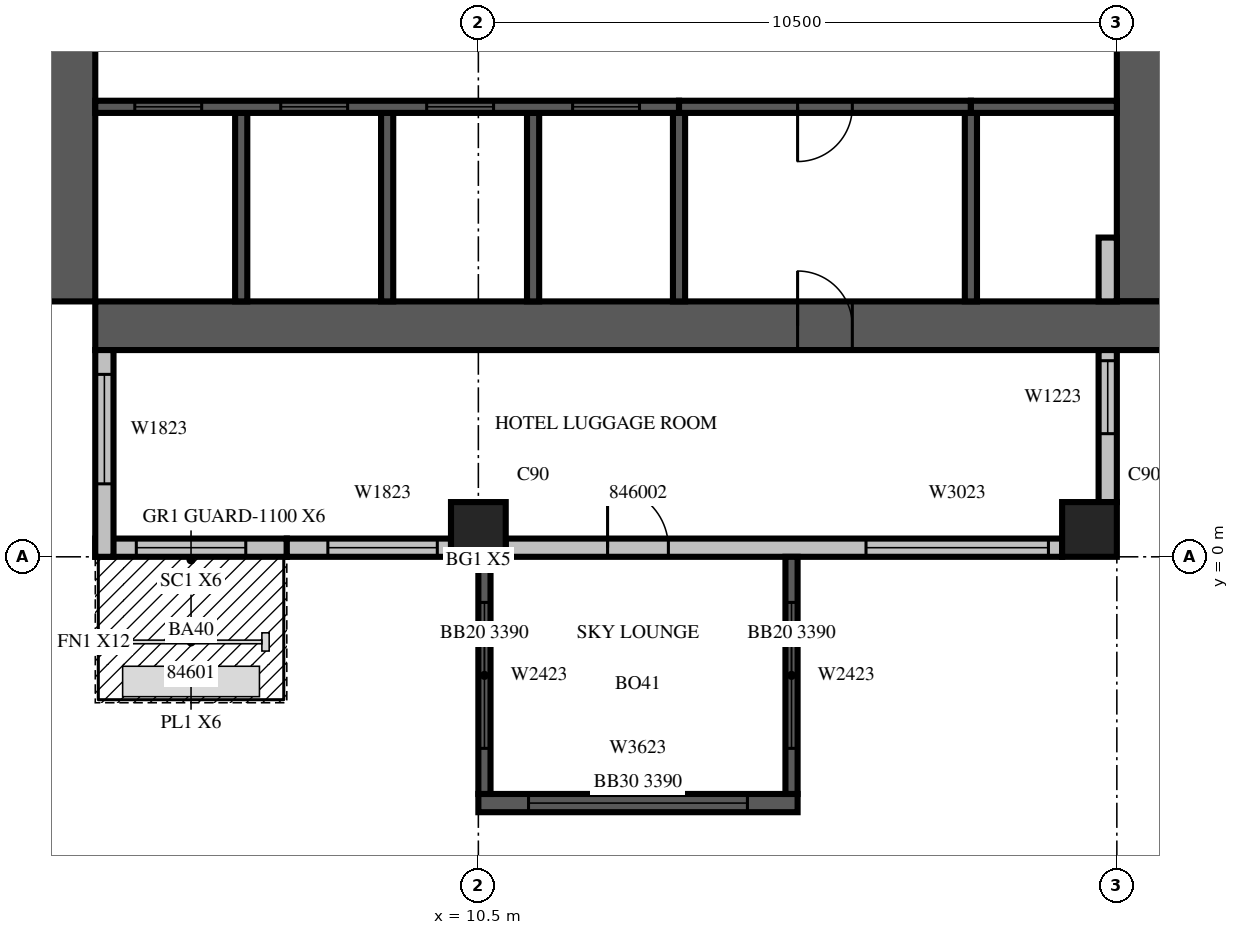
"""IFC4 building model, lengths in metres.
Left out: names, types, materials, properties, quantities, classifications, styles, units other than length and angle.
Written with IfcOpenShell. Run it as: python <this file> out.ifc"""

import sys

from ifc_helpers import new_model, si_unit, direction, frame, frame_2d, origin, origin_2d, place, context, subcontext, project, spatial, rectangle, extrude, source, transform, mapped, element, fill, save


model = new_model("IFC4")
c1 = context("Model", 3, precision=1e-05, world=origin(), true_north=direction((0.0, 1.0)))
c2 = subcontext(c1, "Body", "Model", "MODEL_VIEW")
j1 = project(units=[si_unit("LENGTHUNIT", "METRE"), si_unit("PLANEANGLEUNIT", "RADIAN")], contexts=[c1])
p1 = place(None, origin())
s1 = spatial("IfcSite", under=j1, at=p1, CompositionType="ELEMENT")
p2 = place(p1, origin())
s2 = spatial("IfcBuilding", under=s1, at=p2, CompositionType="ELEMENT")
p3 = place(p2, frame((0.0, 0.0, 208.2)))
s3 = spatial("IfcBuildingStorey", under=s2, at=p3, CompositionType="ELEMENT", Elevation=208.2)
m1 = source(origin(), c2, "Body", "SweptSolid", [
    extrude(rectangle(XDim=0.9, YDim=0.9, at=origin_2d()), origin(), (0.0, 0.0, 1.0), 3.8),
])
for number, where, z_axis, x_axis in (
    (1, (10.5, 0.45, 0.0), (0.0, 0.0, 1.0), (1.0, 0.0, 0.0)),
    (2, (20.55, 0.45, 0.0), (0.0, 0.0, 1.0), (1.0, 0.0, 0.0)),
):
    element("IfcColumn", number, at=place(p3, frame(where, z_axis=z_axis, x_axis=x_axis)), inside=s3, PredefinedType="COLUMN", context=c2, shape_type="MappedRepresentation", body=[
        mapped(m1, transform((0.0, 0.0, 0.0), scale=1.0)),
    ])
m2 = source(origin(), c2, "Body", "SweptSolid", [
    extrude(rectangle(XDim=17.6, YDim=0.8, at=frame_2d((8.8, 0.0))), origin(), (0.0, 0.0, 1.0), 3.8),
])
p4 = place(p3, frame((3.8, 4.2, 0.0), z_axis=(0.0, 0.0, 1.0), x_axis=(0.0, 1.0, 0.0)))
e3 = element("IfcWall", 3, at=p4, inside=s3, PredefinedType="SHEAR", context=c2, shape_type="MappedRepresentation", body=[
    mapped(m2, transform((0.0, 0.0, 0.0), scale=1.0)),
])
m3 = source(origin(), c2, "Body", "SweptSolid", [
    extrude(rectangle(XDim=2.2, YDim=2.1, at=frame_2d((1.1, 1.05))), frame((0.0, 0.41, 0.0), z_axis=(0.0, -1.0, 0.0), x_axis=(1.0, 0.0, 0.0)), (0.0, 0.0, 1.0), 0.82),
])
p5 = place(p4, frame((4.2, 0.0, 0.0)))
e4 = element("IfcOpeningElement", 4, at=p5, cuts=e3, PredefinedType="OPENING", context=c2, shape_type="MappedRepresentation", body=[
    mapped(m3, transform((0.0, 0.0, 0.0), scale=1.0)),
])
m4 = source(origin(), c2, "Body", "SweptSolid", [
    extrude(rectangle(XDim=0.9, YDim=2.1, at=frame_2d((0.45, 1.05))), frame((0.0, 0.41, 0.0), z_axis=(0.0, -1.0, 0.0), x_axis=(1.0, 0.0, 0.0)), (0.0, 0.0, 1.0), 0.82),
])
p6 = place(p4, frame((10.95, 0.0, 0.0)))
e5 = element("IfcOpeningElement", 5, at=p6, cuts=e3, PredefinedType="OPENING", context=c2, shape_type="MappedRepresentation", body=[
    mapped(m4, transform((0.0, 0.0, 0.0), scale=1.0)),
])
m5 = source(origin(), c2, "Body", "SweptSolid", [
    extrude(rectangle(XDim=16.8, YDim=0.8, at=frame_2d((8.4, 0.0))), origin(), (0.0, 0.0, 1.0), 3.8),
])
p7 = place(p3, frame((21.4, 4.2, 0.0), z_axis=(0.0, 0.0, 1.0), x_axis=(0.0, 1.0, 0.0)))
e6 = element("IfcWall", 6, at=p7, inside=s3, PredefinedType="SHEAR", context=c2, shape_type="MappedRepresentation", body=[
    mapped(m5, transform((0.0, 0.0, 0.0), scale=1.0)),
])
m6 = source(origin(), c2, "Body", "SweptSolid", [
    extrude(rectangle(XDim=1.2, YDim=2.1, at=frame_2d((0.6, 1.05))), frame((0.0, 0.41, 0.0), z_axis=(0.0, -1.0, 0.0), x_axis=(1.0, 0.0, 0.0)), (0.0, 0.0, 1.0), 0.82),
])
p8 = place(p7, frame((14.7, 0.0, 0.0)))
e7 = element("IfcOpeningElement", 7, at=p8, cuts=e6, PredefinedType="OPENING", context=c2, shape_type="MappedRepresentation", body=[
    mapped(m6, transform((0.0, 0.0, 0.0), scale=1.0)),
])
p9 = place(p3, frame((4.2, 3.8, 0.0), z_axis=(0.0, 0.0, 1.0), x_axis=(1.0, 0.0, 0.0)))
e8 = element("IfcWall", 8, at=p9, inside=s3, PredefinedType="SHEAR", context=c2, shape_type="MappedRepresentation", body=[
    mapped(m2, transform((0.0, 0.0, 0.0), scale=1.0)),
])
p10 = place(p9, frame((11.55, 0.0, 0.0)))
e9 = element("IfcOpeningElement", 9, at=p10, cuts=e8, PredefinedType="OPENING", context=c2, shape_type="MappedRepresentation", body=[
    mapped(m4, transform((0.0, 0.0, 0.0), scale=1.0)),
])
m7 = source(origin(), c2, "Body", "SweptSolid", [
    extrude(rectangle(XDim=3.15, YDim=0.3, at=frame_2d((1.575, 0.0))), origin(), (0.0, 0.0, 1.0), 3.4),
])
p11 = place(p3, frame((4.2, 0.15, 0.0), z_axis=(0.0, 0.0, 1.0), x_axis=(1.0, 0.0, 0.0)))
e10 = element("IfcWall", 10, at=p11, inside=s3, PredefinedType="STANDARD", context=c2, shape_type="MappedRepresentation", body=[
    mapped(m7, transform((0.0, 0.0, 0.0), scale=1.0)),
])
m8 = source(origin(), c2, "Body", "SweptSolid", [
    extrude(rectangle(XDim=1.8, YDim=2.4, at=frame_2d((0.9, 1.2))), frame((0.0, 0.16, 0.0), z_axis=(0.0, -1.0, 0.0), x_axis=(1.0, 0.0, 0.0)), (0.0, 0.0, 1.0), 0.32),
])
p12 = place(p11, frame((0.675, 0.0, 0.0)))
e11 = element("IfcOpeningElement", 11, at=p12, cuts=e10, PredefinedType="OPENING", context=c2, shape_type="MappedRepresentation", body=[
    mapped(m8, transform((0.0, 0.0, 0.0), scale=1.0)),
])
m9 = source(origin(), c2, "Body", "SweptSolid", [
    extrude(rectangle(XDim=2.7, YDim=0.3, at=frame_2d((1.35, 0.0))), origin(), (0.0, 0.0, 1.0), 3.4),
])
p13 = place(p3, frame((7.35, 0.15, 0.0), z_axis=(0.0, 0.0, 1.0), x_axis=(1.0, 0.0, 0.0)))
e12 = element("IfcWall", 12, at=p13, inside=s3, PredefinedType="STANDARD", context=c2, shape_type="MappedRepresentation", body=[
    mapped(m9, transform((0.0, 0.0, 0.0), scale=1.0)),
])
m10 = source(origin(), c2, "Body", "SweptSolid", [
    extrude(rectangle(XDim=1.8, YDim=2.3, at=frame_2d((0.9, 1.15))), frame((0.0, 0.16, 0.0), z_axis=(0.0, -1.0, 0.0), x_axis=(1.0, 0.0, 0.0)), (0.0, 0.0, 1.0), 0.32),
])
p14 = place(p13, frame((0.675, 0.0, 0.6)))
e13 = element("IfcOpeningElement", 13, at=p14, cuts=e12, PredefinedType="OPENING", context=c2, shape_type="MappedRepresentation", body=[
    mapped(m10, transform((0.0, 0.0, 0.0), scale=1.0)),
])
m11 = source(origin(), c2, "Body", "SweptSolid", [
    extrude(rectangle(XDim=9.15, YDim=0.3, at=frame_2d((4.575, 0.0))), origin(), (0.0, 0.0, 1.0), 3.4),
])
p15 = place(p3, frame((10.95, 0.15, 0.0), z_axis=(0.0, 0.0, 1.0), x_axis=(1.0, 0.0, 0.0)))
e14 = element("IfcWall", 14, at=p15, inside=s3, PredefinedType="STANDARD", context=c2, shape_type="MappedRepresentation", body=[
    mapped(m11, transform((0.0, 0.0, 0.0), scale=1.0)),
])
m12 = source(origin(), c2, "Body", "SweptSolid", [
    extrude(rectangle(XDim=3.0, YDim=2.3, at=frame_2d((1.5, 1.15))), frame((0.0, 0.16, 0.0), z_axis=(0.0, -1.0, 0.0), x_axis=(1.0, 0.0, 0.0)), (0.0, 0.0, 1.0), 0.32),
])
p16 = place(p15, frame((5.925, 0.0, 0.6)))
e15 = element("IfcOpeningElement", 15, at=p16, cuts=e14, PredefinedType="OPENING", context=c2, shape_type="MappedRepresentation", body=[
    mapped(m12, transform((0.0, 0.0, 0.0), scale=1.0)),
])
m13 = source(origin(), c2, "Body", "SweptSolid", [
    extrude(rectangle(XDim=1.0, YDim=2.1, at=frame_2d((0.5, 1.05))), frame((0.0, 0.16, 0.0), z_axis=(0.0, -1.0, 0.0), x_axis=(1.0, 0.0, 0.0)), (0.0, 0.0, 1.0), 0.32),
])
p17 = place(p15, frame((1.675, 0.0, 0.0)))
e16 = element("IfcOpeningElement", 16, at=p17, cuts=e14, PredefinedType="OPENING", context=c2, shape_type="MappedRepresentation", body=[
    mapped(m13, transform((0.0, 0.0, 0.0), scale=1.0)),
])
m14 = source(origin(), c2, "Body", "SweptSolid", [
    extrude(rectangle(XDim=2.5, YDim=0.3, at=frame_2d((1.25, 0.0))), origin(), (0.0, 0.0, 1.0), 3.4),
])
p18 = place(p3, frame((20.85, 0.9, 0.0), z_axis=(0.0, 0.0, 1.0), x_axis=(0.0, 1.0, 0.0)))
e17 = element("IfcWall", 17, at=p18, inside=s3, PredefinedType="STANDARD", context=c2, shape_type="MappedRepresentation", body=[
    mapped(m14, transform((0.0, 0.0, 0.0), scale=1.0)),
])
m15 = source(origin(), c2, "Body", "SweptSolid", [
    extrude(rectangle(XDim=1.2, YDim=2.3, at=frame_2d((0.6, 1.15))), frame((0.0, 0.16, 0.0), z_axis=(0.0, -1.0, 0.0), x_axis=(1.0, 0.0, 0.0)), (0.0, 0.0, 1.0), 0.32),
])
p19 = place(p18, frame((1.125, 0.0, 0.6)))
e18 = element("IfcOpeningElement", 18, at=p19, cuts=e17, PredefinedType="OPENING", context=c2, shape_type="MappedRepresentation", body=[
    mapped(m15, transform((0.0, 0.0, 0.0), scale=1.0)),
])
m16 = source(origin(), c2, "Body", "SweptSolid", [
    extrude(rectangle(XDim=1.05, YDim=0.3, at=frame_2d((0.525, 0.0))), origin(), (0.0, 0.0, 1.0), 3.4),
])
p20 = place(p3, frame((20.85, 4.2, 0.0), z_axis=(0.0, 0.0, 1.0), x_axis=(0.0, 1.0, 0.0)))
e19 = element("IfcWall", 19, at=p20, inside=s3, PredefinedType="STANDARD", context=c2, shape_type="MappedRepresentation", body=[
    mapped(m16, transform((0.0, 0.0, 0.0), scale=1.0)),
])
m17 = source(origin(), c2, "Body", "SweptSolid", [
    extrude(rectangle(XDim=3.4, YDim=0.3, at=frame_2d((1.7, 0.0))), origin(), (0.0, 0.0, 1.0), 3.4),
])
p21 = place(p3, frame((4.35, 3.4, 0.0), z_axis=(0.0, 0.0, 1.0), x_axis=(0.0, -1.0, 0.0)))
e20 = element("IfcWall", 20, at=p21, inside=s3, PredefinedType="STANDARD", context=c2, shape_type="MappedRepresentation", body=[
    mapped(m17, transform((0.0, 0.0, 0.0), scale=1.0)),
])
p22 = place(p21, frame((0.4, 0.0, 0.6)))
e21 = element("IfcOpeningElement", 21, at=p22, cuts=e20, PredefinedType="OPENING", context=c2, shape_type="MappedRepresentation", body=[
    mapped(m10, transform((0.0, 0.0, 0.0), scale=1.0)),
])
m18 = source(origin(), c2, "Body", "SweptSolid", [
    extrude(rectangle(XDim=5.25, YDim=0.3, at=frame_2d((2.625, 0.0))), origin(), (0.0, 0.0, 1.0), 3.39),
])
p23 = place(p3, frame((10.5, -4.05, 0.0), z_axis=(0.0, 0.0, 1.0), x_axis=(1.0, 0.0, 0.0)))
e22 = element("IfcWall", 22, at=p23, inside=s3, PredefinedType="SOLIDWALL", context=c2, shape_type="MappedRepresentation", body=[
    mapped(m18, transform((0.0, 0.0, 0.0), scale=1.0)),
])
m19 = source(origin(), c2, "Body", "SweptSolid", [
    extrude(rectangle(XDim=3.6, YDim=2.3, at=frame_2d((1.8, 1.15))), frame((0.0, 0.16, 0.0), z_axis=(0.0, -1.0, 0.0), x_axis=(1.0, 0.0, 0.0)), (0.0, 0.0, 1.0), 0.32),
])
p24 = place(p23, frame((0.825, 0.0, 0.6)))
e23 = element("IfcOpeningElement", 23, at=p24, cuts=e22, PredefinedType="OPENING", context=c2, shape_type="MappedRepresentation", body=[
    mapped(m19, transform((0.0, 0.0, 0.0), scale=1.0)),
])
m20 = source(origin(), c2, "Body", "SweptSolid", [
    extrude(rectangle(XDim=3.9, YDim=0.2, at=frame_2d((1.95, 0.0))), origin(), (0.0, 0.0, 1.0), 3.39),
])
p25 = place(p3, frame((10.6, 0.0, 0.0), z_axis=(0.0, 0.0, 1.0), x_axis=(0.0, -1.0, 0.0)))
e24 = element("IfcWall", 24, at=p25, inside=s3, PredefinedType="SOLIDWALL", context=c2, shape_type="MappedRepresentation", body=[
    mapped(m20, transform((0.0, 0.0, 0.0), scale=1.0)),
])
m21 = source(origin(), c2, "Body", "SweptSolid", [
    extrude(rectangle(XDim=2.4, YDim=2.3, at=frame_2d((1.2, 1.15))), frame((0.0, 0.11, 0.0), z_axis=(0.0, -1.0, 0.0), x_axis=(1.0, 0.0, 0.0)), (0.0, 0.0, 1.0), 0.22),
])
p26 = place(p25, frame((0.75, 0.0, 0.6)))
e25 = element("IfcOpeningElement", 25, at=p26, cuts=e24, PredefinedType="OPENING", context=c2, shape_type="MappedRepresentation", body=[
    mapped(m21, transform((0.0, 0.0, 0.0), scale=1.0)),
])
p27 = place(p3, frame((15.65, 0.0, 0.0), z_axis=(0.0, 0.0, 1.0), x_axis=(0.0, -1.0, 0.0)))
e26 = element("IfcWall", 26, at=p27, inside=s3, PredefinedType="SOLIDWALL", context=c2, shape_type="MappedRepresentation", body=[
    mapped(m20, transform((0.0, 0.0, 0.0), scale=1.0)),
])
p28 = place(p27, frame((0.75, 0.0, 0.6)))
e27 = element("IfcOpeningElement", 27, at=p28, cuts=e26, PredefinedType="OPENING", context=c2, shape_type="MappedRepresentation", body=[
    mapped(m21, transform((0.0, 0.0, 0.0), scale=1.0)),
])
m22 = source(origin(), c2, "Body", "SweptSolid", [
    extrude(rectangle(XDim=3.1, YDim=0.2, at=frame_2d((1.55, 0.0))), origin(), (0.0, 0.0, 1.0), 3.8),
])
for number, where, z_axis, x_axis in (
    (28, (6.6, 4.2, 0.0), (0.0, 0.0, 1.0), (0.0, 1.0, 0.0)),
    (29, (9.0, 4.2, 0.0), (0.0, 0.0, 1.0), (0.0, 1.0, 0.0)),
    (30, (11.4, 4.2, 0.0), (0.0, 0.0, 1.0), (0.0, 1.0, 0.0)),
):
    element("IfcWall", number, at=place(p3, frame(where, z_axis=z_axis, x_axis=x_axis)), inside=s3, PredefinedType="SOLIDWALL", context=c2, shape_type="MappedRepresentation", body=[
        mapped(m22, transform((0.0, 0.0, 0.0), scale=1.0)),
    ])
m23 = source(origin(), c2, "Body", "SweptSolid", [
    extrude(rectangle(XDim=3.1, YDim=0.2, at=frame_2d((1.55, 0.0))), origin(), (0.0, 0.0, 1.0), 3.4),
])
for number, where, z_axis, x_axis in (
    (31, (13.8, 4.2, 0.0), (0.0, 0.0, 1.0), (0.0, 1.0, 0.0)),
    (32, (18.6, 4.2, 0.0), (0.0, 0.0, 1.0), (0.0, 1.0, 0.0)),
):
    element("IfcWall", number, at=place(p3, frame(where, z_axis=z_axis, x_axis=x_axis)), inside=s3, PredefinedType="SOLIDWALL", context=c2, shape_type="MappedRepresentation", body=[
        mapped(m23, transform((0.0, 0.0, 0.0), scale=1.0)),
    ])
m24 = source(origin(), c2, "Body", "SweptSolid", [
    extrude(rectangle(XDim=9.6, YDim=0.2, at=frame_2d((4.8, 0.0))), origin(), (0.0, 0.0, 1.0), 3.8),
])
p29 = place(p3, frame((4.2, 7.4, 0.0), z_axis=(0.0, 0.0, 1.0), x_axis=(1.0, 0.0, 0.0)))
e33 = element("IfcWall", 33, at=p29, inside=s3, PredefinedType="SOLIDWALL", context=c2, shape_type="MappedRepresentation", body=[
    mapped(m24, transform((0.0, 0.0, 0.0), scale=1.0)),
])
m25 = source(origin(), c2, "Body", "SweptSolid", [
    extrude(rectangle(XDim=1.1, YDim=2.1, at=frame_2d((0.55, 1.05))), frame((0.0, 0.11, 0.0), z_axis=(0.0, -1.0, 0.0), x_axis=(1.0, 0.0, 0.0)), (0.0, 0.0, 1.0), 0.22),
])
p30 = place(p29, frame((0.65, 0.0, 0.0)))
e34 = element("IfcOpeningElement", 34, at=p30, cuts=e33, PredefinedType="OPENING", context=c2, shape_type="MappedRepresentation", body=[
    mapped(m25, transform((0.0, 0.0, 0.0), scale=1.0)),
])
p31 = place(p29, frame((3.05, 0.0, 0.0)))
e35 = element("IfcOpeningElement", 35, at=p31, cuts=e33, PredefinedType="OPENING", context=c2, shape_type="MappedRepresentation", body=[
    mapped(m25, transform((0.0, 0.0, 0.0), scale=1.0)),
])
p32 = place(p29, frame((5.45, 0.0, 0.0)))
e36 = element("IfcOpeningElement", 36, at=p32, cuts=e33, PredefinedType="OPENING", context=c2, shape_type="MappedRepresentation", body=[
    mapped(m25, transform((0.0, 0.0, 0.0), scale=1.0)),
])
p33 = place(p29, frame((7.85, 0.0, 0.0)))
e37 = element("IfcOpeningElement", 37, at=p33, cuts=e33, PredefinedType="OPENING", context=c2, shape_type="MappedRepresentation", body=[
    mapped(m25, transform((0.0, 0.0, 0.0), scale=1.0)),
])
m26 = source(origin(), c2, "Body", "SweptSolid", [
    extrude(rectangle(XDim=4.8, YDim=0.2, at=frame_2d((2.4, 0.0))), origin(), (0.0, 0.0, 1.0), 3.4),
])
p34 = place(p3, frame((13.8, 7.4, 0.0), z_axis=(0.0, 0.0, 1.0), x_axis=(1.0, 0.0, 0.0)))
e38 = element("IfcWall", 38, at=p34, inside=s3, PredefinedType="SOLIDWALL", context=c2, shape_type="MappedRepresentation", body=[
    mapped(m26, transform((0.0, 0.0, 0.0), scale=1.0)),
])
m27 = source(origin(), c2, "Body", "SweptSolid", [
    extrude(rectangle(XDim=0.9, YDim=2.1, at=frame_2d((0.45, 1.05))), frame((0.0, 0.11, 0.0), z_axis=(0.0, -1.0, 0.0), x_axis=(1.0, 0.0, 0.0)), (0.0, 0.0, 1.0), 0.22),
])
p35 = place(p34, frame((1.95, 0.0, 0.0)))
e39 = element("IfcOpeningElement", 39, at=p35, cuts=e38, PredefinedType="OPENING", context=c2, shape_type="MappedRepresentation", body=[
    mapped(m27, transform((0.0, 0.0, 0.0), scale=1.0)),
])
m28 = source(origin(), c2, "Body", "SweptSolid", [
    extrude(rectangle(XDim=2.4, YDim=0.2, at=frame_2d((1.2, 0.0))), origin(), (0.0, 0.0, 1.0), 3.8),
])
p36 = place(p3, frame((18.6, 7.4, 0.0), z_axis=(0.0, 0.0, 1.0), x_axis=(1.0, 0.0, 0.0)))
e40 = element("IfcWall", 40, at=p36, inside=s3, PredefinedType="SOLIDWALL", context=c2, shape_type="MappedRepresentation", body=[
    mapped(m28, transform((0.0, 0.0, 0.0), scale=1.0)),
])
m29 = source(origin(), c2, "Body", "SweptSolid", [
    extrude(rectangle(XDim=1.8, YDim=2.4, at=frame_2d((0.9, 1.2))), frame((0.0, 0.025, 0.0), z_axis=(0.0, -1.0, 0.0), x_axis=(1.0, 0.0, 0.0)), (0.0, 0.0, 1.0), 0.05),
])
p37 = place(p12, origin())
e41 = element("IfcDoor", 41, at=p37, inside=s3, OperationType="SLIDING_TO_LEFT", PredefinedType="DOOR", context=c2, shape_type="MappedRepresentation", body=[
    mapped(m29, transform((0.0, 0.0, 0.0), scale=1.0)),
])
fill(e11, e41)
m30 = source(origin(), c2, "Body", "SweptSolid", [
    extrude(rectangle(XDim=1.8, YDim=2.3, at=frame_2d((0.9, 1.15))), frame((0.0, 0.03, 0.0), z_axis=(0.0, -1.0, 0.0), x_axis=(1.0, 0.0, 0.0)), (0.0, 0.0, 1.0), 0.06),
])
p38 = place(p14, origin())
e42 = element("IfcWindow", 42, at=p38, inside=s3, PartitioningType="SINGLE_PANEL", PredefinedType="WINDOW", context=c2, shape_type="MappedRepresentation", body=[
    mapped(m30, transform((0.0, 0.0, 0.0), scale=1.0)),
])
fill(e13, e42)
m31 = source(origin(), c2, "Body", "SweptSolid", [
    extrude(rectangle(XDim=3.0, YDim=2.3, at=frame_2d((1.5, 1.15))), frame((0.0, 0.03, 0.0), z_axis=(0.0, -1.0, 0.0), x_axis=(1.0, 0.0, 0.0)), (0.0, 0.0, 1.0), 0.06),
])
p39 = place(p16, origin())
e43 = element("IfcWindow", 43, at=p39, inside=s3, PartitioningType="SINGLE_PANEL", PredefinedType="WINDOW", context=c2, shape_type="MappedRepresentation", body=[
    mapped(m31, transform((0.0, 0.0, 0.0), scale=1.0)),
])
fill(e15, e43)
m32 = source(origin(), c2, "Body", "SweptSolid", [
    extrude(rectangle(XDim=1.2, YDim=2.3, at=frame_2d((0.6, 1.15))), frame((0.0, 0.03, 0.0), z_axis=(0.0, -1.0, 0.0), x_axis=(1.0, 0.0, 0.0)), (0.0, 0.0, 1.0), 0.06),
])
p40 = place(p19, origin())
e44 = element("IfcWindow", 44, at=p40, inside=s3, PartitioningType="SINGLE_PANEL", PredefinedType="WINDOW", context=c2, shape_type="MappedRepresentation", body=[
    mapped(m32, transform((0.0, 0.0, 0.0), scale=1.0)),
])
fill(e18, e44)
p41 = place(p22, origin())
e45 = element("IfcWindow", 45, at=p41, inside=s3, PartitioningType="SINGLE_PANEL", PredefinedType="WINDOW", context=c2, shape_type="MappedRepresentation", body=[
    mapped(m30, transform((0.0, 0.0, 0.0), scale=1.0)),
])
fill(e21, e45)
m33 = source(origin(), c2, "Body", "SweptSolid", [
    extrude(rectangle(XDim=3.6, YDim=2.3, at=frame_2d((1.8, 1.15))), frame((0.0, 0.03, 0.0), z_axis=(0.0, -1.0, 0.0), x_axis=(1.0, 0.0, 0.0)), (0.0, 0.0, 1.0), 0.06),
])
p42 = place(p24, origin())
e46 = element("IfcWindow", 46, at=p42, inside=s3, PartitioningType="SINGLE_PANEL", PredefinedType="WINDOW", context=c2, shape_type="MappedRepresentation", body=[
    mapped(m33, transform((0.0, 0.0, 0.0), scale=1.0)),
])
fill(e23, e46)
m34 = source(origin(), c2, "Body", "SweptSolid", [
    extrude(rectangle(XDim=2.4, YDim=2.3, at=frame_2d((1.2, 1.15))), frame((0.0, 0.03, 0.0), z_axis=(0.0, -1.0, 0.0), x_axis=(1.0, 0.0, 0.0)), (0.0, 0.0, 1.0), 0.06),
])
p43 = place(p26, origin())
e47 = element("IfcWindow", 47, at=p43, inside=s3, PartitioningType="SINGLE_PANEL", PredefinedType="WINDOW", context=c2, shape_type="MappedRepresentation", body=[
    mapped(m34, transform((0.0, 0.0, 0.0), scale=1.0)),
])
fill(e25, e47)
p44 = place(p28, origin())
e48 = element("IfcWindow", 48, at=p44, inside=s3, PartitioningType="SINGLE_PANEL", PredefinedType="WINDOW", context=c2, shape_type="MappedRepresentation", body=[
    mapped(m34, transform((0.0, 0.0, 0.0), scale=1.0)),
])
fill(e27, e48)
m35 = source(origin(), c2, "Body", "SweptSolid", [
    extrude(rectangle(XDim=1.1, YDim=2.1, at=frame_2d((0.55, 1.05))), frame((0.0, 0.025, 0.0), z_axis=(0.0, -1.0, 0.0), x_axis=(1.0, 0.0, 0.0)), (0.0, 0.0, 1.0), 0.05),
])
p45 = place(p30, origin())
e49 = element("IfcDoor", 49, at=p45, inside=s3, OperationType="SLIDING_TO_LEFT", PredefinedType="DOOR", context=c2, shape_type="MappedRepresentation", body=[
    mapped(m35, transform((0.0, 0.0, 0.0), scale=1.0)),
])
fill(e34, e49)
p46 = place(p31, origin())
e50 = element("IfcDoor", 50, at=p46, inside=s3, OperationType="SLIDING_TO_LEFT", PredefinedType="DOOR", context=c2, shape_type="MappedRepresentation", body=[
    mapped(m35, transform((0.0, 0.0, 0.0), scale=1.0)),
])
fill(e35, e50)
p47 = place(p32, origin())
e51 = element("IfcDoor", 51, at=p47, inside=s3, OperationType="SLIDING_TO_LEFT", PredefinedType="DOOR", context=c2, shape_type="MappedRepresentation", body=[
    mapped(m35, transform((0.0, 0.0, 0.0), scale=1.0)),
])
fill(e36, e51)
p48 = place(p33, origin())
e52 = element("IfcDoor", 52, at=p48, inside=s3, OperationType="SLIDING_TO_LEFT", PredefinedType="DOOR", context=c2, shape_type="MappedRepresentation", body=[
    mapped(m35, transform((0.0, 0.0, 0.0), scale=1.0)),
])
fill(e37, e52)
m36 = source(origin(), c2, "Body", "SweptSolid", [
    extrude(rectangle(XDim=0.9, YDim=2.1, at=frame_2d((0.45, 1.05))), frame((0.0, 0.025, 0.0), z_axis=(0.0, -1.0, 0.0), x_axis=(1.0, 0.0, 0.0)), (0.0, 0.0, 1.0), 0.05),
])
p49 = place(p35, origin())
e53 = element("IfcDoor", 53, at=p49, inside=s3, OperationType="SINGLE_SWING_RIGHT", PredefinedType="DOOR", context=c2, shape_type="MappedRepresentation", body=[
    mapped(m36, transform((0.0, 0.0, 0.0), scale=1.0)),
])
fill(e39, e53)
p50 = place(p10, origin())
e54 = element("IfcDoor", 54, at=p50, inside=s3, OperationType="SINGLE_SWING_LEFT", PredefinedType="DOOR", context=c2, shape_type="MappedRepresentation", body=[
    mapped(m36, transform((0.0, 0.0, 0.0), scale=1.0)),
])
fill(e9, e54)
m37 = source(origin(), c2, "Body", "SweptSolid", [
    extrude(rectangle(XDim=1.0, YDim=2.1, at=frame_2d((0.5, 1.05))), frame((0.0, 0.025, 0.0), z_axis=(0.0, -1.0, 0.0), x_axis=(1.0, 0.0, 0.0)), (0.0, 0.0, 1.0), 0.05),
])
p51 = place(p17, origin())
e55 = element("IfcDoor", 55, at=p51, inside=s3, OperationType="SINGLE_SWING_LEFT", PredefinedType="DOOR", context=c2, shape_type="MappedRepresentation", body=[
    mapped(m37, transform((0.0, 0.0, 0.0), scale=1.0)),
])
fill(e16, e55)
save(model, sys.argv[1])
